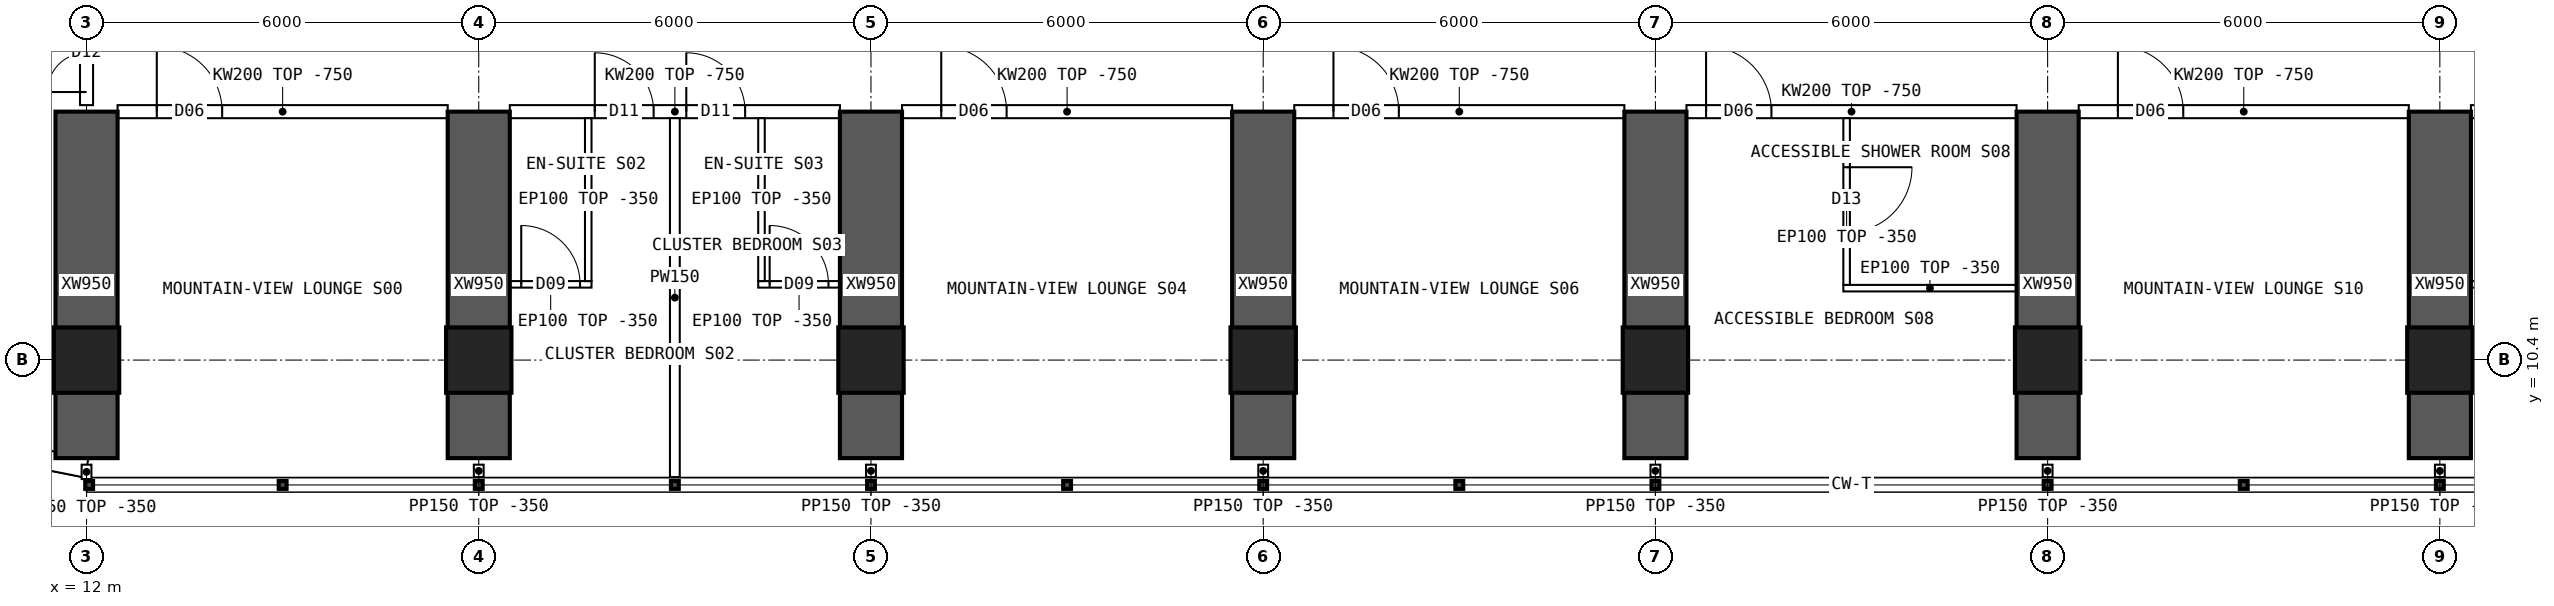
"""IFC4 building model, lengths in metres.
Left out: names, types, materials, properties, quantities, classifications, styles, units other than length and angle.
Written with IfcOpenShell. Run it as: python <this file> out.ifc"""

import sys

from ifc_helpers import new_model, si_unit, direction, frame, frame_2d, origin, origin_2d, place, context, subcontext, project, spatial, polyline, rectangle, hollow_rectangle, outline, extrude, element, fill, save


model = new_model("IFC4")
c1 = context("Model", 3, precision=1e-05, world=origin(), true_north=direction((0.0, 1.0)))
c2 = subcontext(c1, "Body", "Model", "MODEL_VIEW")
j1 = project(units=[si_unit("LENGTHUNIT", "METRE"), si_unit("PLANEANGLEUNIT", "RADIAN")], contexts=[c1])
p1 = place(None, origin())
s1 = spatial("IfcSite", under=j1, at=p1, CompositionType="ELEMENT")
p2 = place(p1, origin())
s2 = spatial("IfcBuilding", under=s1, at=p2, CompositionType="ELEMENT")
p3 = place(p2, frame((0.0, 0.0, 129.4)))
s3 = spatial("IfcBuildingStorey", under=s2, at=p3, CompositionType="ELEMENT", Elevation=129.4)
for number, where, z_axis, x_axis in (
    (1, (12.0, 10.4, 0.0), (0.0, 0.0, 1.0), (1.0, 0.0, 0.0)),
    (2, (18.0, 10.4, 0.0), (0.0, 0.0, 1.0), (1.0, 0.0, 0.0)),
    (3, (24.0, 10.4, 0.0), (0.0, 0.0, 1.0), (1.0, 0.0, 0.0)),
    (4, (30.0, 10.4, 0.0), (0.0, 0.0, 1.0), (1.0, 0.0, 0.0)),
    (5, (36.0, 10.4, 0.0), (0.0, 0.0, 1.0), (1.0, 0.0, 0.0)),
    (6, (42.0, 10.4, 0.0), (0.0, 0.0, 1.0), (1.0, 0.0, 0.0)),
    (7, (48.0, 10.4, 0.0), (0.0, 0.0, 1.0), (1.0, 0.0, 0.0)),
):
    element("IfcColumn", number, at=place(p3, frame(where, z_axis=z_axis, x_axis=x_axis)), inside=s3, PredefinedType="COLUMN", context=c2, shape_type="SweptSolid", body=[
        extrude(hollow_rectangle(XDim=1.0, YDim=1.0, WallThickness=0.1, at=origin_2d()), origin(), (0.0, 0.0, 1.0), 3.75),
    ])
for number, where, z_axis, x_axis in (
    (8, (12.0, 8.9, 0.0), (0.0, 0.0, 1.0), (0.0, 1.0, 0.0)),
    (9, (18.0, 8.9, 0.0), (0.0, 0.0, 1.0), (0.0, 1.0, 0.0)),
    (10, (24.0, 8.9, 0.0), (0.0, 0.0, 1.0), (0.0, 1.0, 0.0)),
    (11, (30.0, 8.9, 0.0), (0.0, 0.0, 1.0), (0.0, 1.0, 0.0)),
    (12, (36.0, 8.9, 0.0), (0.0, 0.0, 1.0), (0.0, 1.0, 0.0)),
    (13, (42.0, 8.9, 0.0), (0.0, 0.0, 1.0), (0.0, 1.0, 0.0)),
    (14, (48.0, 8.9, 0.0), (0.0, 0.0, 1.0), (0.0, 1.0, 0.0)),
):
    element("IfcWall", number, at=place(p3, frame(where, z_axis=z_axis, x_axis=x_axis)), inside=s3, PredefinedType="SHEAR", context=c2, shape_type="SweptSolid", body=[
        extrude(rectangle(XDim=5.3, YDim=0.95, at=frame_2d((2.65, 0.0))), origin(), (0.0, 0.0, 1.0), 3.75),
    ])
p4 = place(p3, frame((8.843, 9.378, 0.0), z_axis=(0.0, 0.0, 1.0), x_axis=(0.980787251524, -0.195080412259, 0.0)))
e15 = element("IfcWall", 15, at=p4, inside=s3, PredefinedType="SOLIDWALL", context=c2, shape_type="SweptSolid", body=[
    extrude(outline(polyline([(-0.03, -0.15), (3.249, -0.15), (3.189, 0.15), (0.03, 0.15), (-0.03, -0.15)])), origin(), (0.0, 0.0, 1.0), 3.4),
])
p5 = place(p4, frame((0.909, 0.0, 0.9)))
e16 = element("IfcOpeningElement", 16, at=p5, cuts=e15, PredefinedType="OPENING", context=c2, shape_type="SweptSolid", body=[
    extrude(rectangle(XDim=1.4, YDim=1.8, at=frame_2d((0.7, 0.9))), frame((0.0, 0.16, 0.0), z_axis=(0.0, -1.0, 0.0), x_axis=(1.0, 0.0, 0.0)), (0.0, 0.0, 1.0), 0.32),
])
p6 = place(p3, frame((12.475, 14.2, 0.0), z_axis=(0.0, 0.0, 1.0), x_axis=(1.0, 0.0, 0.0)))
e17 = element("IfcWall", 17, at=p6, inside=s3, PredefinedType="SOLIDWALL", context=c2, shape_type="SweptSolid", body=[
    extrude(outline(polyline([(0.0, 0.0), (5.05, 0.0), (5.05, 3.0), (0.0, 3.0), (0.0, 0.0)])), frame((0.0, 0.1, 0.0), z_axis=(0.0, -1.0, 0.0), x_axis=(1.0, 0.0, 0.0)), (0.0, 0.0, 1.0), 0.2),
])
p7 = place(p6, frame((0.6, 0.0, 0.0)))
e18 = element("IfcOpeningElement", 18, at=p7, cuts=e17, PredefinedType="OPENING", context=c2, shape_type="SweptSolid", body=[
    extrude(rectangle(XDim=1.0, YDim=2.1, at=frame_2d((0.5, 1.05))), frame((0.0, 0.11, 0.0), z_axis=(0.0, -1.0, 0.0), x_axis=(1.0, 0.0, 0.0)), (0.0, 0.0, 1.0), 0.22),
])
p8 = place(p3, frame((18.475, 14.2, 0.0), z_axis=(0.0, 0.0, 1.0), x_axis=(1.0, 0.0, 0.0)))
e19 = element("IfcWall", 19, at=p8, inside=s3, PredefinedType="SOLIDWALL", context=c2, shape_type="SweptSolid", body=[
    extrude(outline(polyline([(0.0, 0.0), (5.05, 0.0), (5.05, 3.0), (0.0, 3.0), (0.0, 0.0)])), frame((0.0, 0.1, 0.0), z_axis=(0.0, -1.0, 0.0), x_axis=(1.0, 0.0, 0.0)), (0.0, 0.0, 1.0), 0.2),
])
p9 = place(p8, frame((1.3, 0.0, 0.0)))
e20 = element("IfcOpeningElement", 20, at=p9, cuts=e19, PredefinedType="OPENING", context=c2, shape_type="SweptSolid", body=[
    extrude(rectangle(XDim=0.9, YDim=2.1, at=frame_2d((0.45, 1.05))), frame((0.0, 0.11, 0.0), z_axis=(0.0, -1.0, 0.0), x_axis=(1.0, 0.0, 0.0)), (0.0, 0.0, 1.0), 0.22),
])
p10 = place(p8, frame((2.7, 0.0, 0.0)))
e21 = element("IfcOpeningElement", 21, at=p10, cuts=e19, PredefinedType="OPENING", context=c2, shape_type="SweptSolid", body=[
    extrude(rectangle(XDim=0.9, YDim=2.1, at=frame_2d((0.45, 1.05))), frame((0.0, 0.11, 0.0), z_axis=(0.0, -1.0, 0.0), x_axis=(1.0, 0.0, 0.0)), (0.0, 0.0, 1.0), 0.22),
])
p11 = place(p3, frame((24.475, 14.2, 0.0), z_axis=(0.0, 0.0, 1.0), x_axis=(1.0, 0.0, 0.0)))
e22 = element("IfcWall", 22, at=p11, inside=s3, PredefinedType="SOLIDWALL", context=c2, shape_type="SweptSolid", body=[
    extrude(outline(polyline([(0.0, 0.0), (5.05, 0.0), (5.05, 3.0), (0.0, 3.0), (0.0, 0.0)])), frame((0.0, 0.1, 0.0), z_axis=(0.0, -1.0, 0.0), x_axis=(1.0, 0.0, 0.0)), (0.0, 0.0, 1.0), 0.2),
])
p12 = place(p11, frame((0.6, 0.0, 0.0)))
e23 = element("IfcOpeningElement", 23, at=p12, cuts=e22, PredefinedType="OPENING", context=c2, shape_type="SweptSolid", body=[
    extrude(rectangle(XDim=1.0, YDim=2.1, at=frame_2d((0.5, 1.05))), frame((0.0, 0.11, 0.0), z_axis=(0.0, -1.0, 0.0), x_axis=(1.0, 0.0, 0.0)), (0.0, 0.0, 1.0), 0.22),
])
p13 = place(p3, frame((30.475, 14.2, 0.0), z_axis=(0.0, 0.0, 1.0), x_axis=(1.0, 0.0, 0.0)))
e24 = element("IfcWall", 24, at=p13, inside=s3, PredefinedType="SOLIDWALL", context=c2, shape_type="SweptSolid", body=[
    extrude(outline(polyline([(0.0, 0.0), (5.05, 0.0), (5.05, 3.0), (0.0, 3.0), (0.0, 0.0)])), frame((0.0, 0.1, 0.0), z_axis=(0.0, -1.0, 0.0), x_axis=(1.0, 0.0, 0.0)), (0.0, 0.0, 1.0), 0.2),
])
p14 = place(p13, frame((0.6, 0.0, 0.0)))
e25 = element("IfcOpeningElement", 25, at=p14, cuts=e24, PredefinedType="OPENING", context=c2, shape_type="SweptSolid", body=[
    extrude(rectangle(XDim=1.0, YDim=2.1, at=frame_2d((0.5, 1.05))), frame((0.0, 0.11, 0.0), z_axis=(0.0, -1.0, 0.0), x_axis=(1.0, 0.0, 0.0)), (0.0, 0.0, 1.0), 0.22),
])
p15 = place(p3, frame((36.475, 14.2, 0.0), z_axis=(0.0, 0.0, 1.0), x_axis=(1.0, 0.0, 0.0)))
e26 = element("IfcWall", 26, at=p15, inside=s3, PredefinedType="SOLIDWALL", context=c2, shape_type="SweptSolid", body=[
    extrude(outline(polyline([(0.0, 0.0), (5.05, 0.0), (5.05, 3.0), (0.0, 3.0), (0.0, 0.0)])), frame((0.0, 0.1, 0.0), z_axis=(0.0, -1.0, 0.0), x_axis=(1.0, 0.0, 0.0)), (0.0, 0.0, 1.0), 0.2),
])
p16 = place(p15, frame((0.3, 0.0, 0.0)))
e27 = element("IfcOpeningElement", 27, at=p16, cuts=e26, PredefinedType="OPENING", context=c2, shape_type="SweptSolid", body=[
    extrude(rectangle(XDim=1.0, YDim=2.1, at=frame_2d((0.5, 1.05))), frame((0.0, 0.11, 0.0), z_axis=(0.0, -1.0, 0.0), x_axis=(1.0, 0.0, 0.0)), (0.0, 0.0, 1.0), 0.22),
])
p17 = place(p3, frame((42.475, 14.2, 0.0), z_axis=(0.0, 0.0, 1.0), x_axis=(1.0, 0.0, 0.0)))
e28 = element("IfcWall", 28, at=p17, inside=s3, PredefinedType="SOLIDWALL", context=c2, shape_type="SweptSolid", body=[
    extrude(outline(polyline([(0.0, 0.0), (5.05, 0.0), (5.05, 3.0), (0.0, 3.0), (0.0, 0.0)])), frame((0.0, 0.1, 0.0), z_axis=(0.0, -1.0, 0.0), x_axis=(1.0, 0.0, 0.0)), (0.0, 0.0, 1.0), 0.2),
])
p18 = place(p17, frame((0.6, 0.0, 0.0)))
e29 = element("IfcOpeningElement", 29, at=p18, cuts=e28, PredefinedType="OPENING", context=c2, shape_type="SweptSolid", body=[
    extrude(rectangle(XDim=1.0, YDim=2.1, at=frame_2d((0.5, 1.05))), frame((0.0, 0.11, 0.0), z_axis=(0.0, -1.0, 0.0), x_axis=(1.0, 0.0, 0.0)), (0.0, 0.0, 1.0), 0.22),
])
p19 = place(p3, frame((48.475, 14.2, 0.0), z_axis=(0.0, 0.0, 1.0), x_axis=(1.0, 0.0, 0.0)))
e30 = element("IfcWall", 30, at=p19, inside=s3, PredefinedType="SOLIDWALL", context=c2, shape_type="SweptSolid", body=[
    extrude(outline(polyline([(0.0, 0.0), (5.05, 0.0), (5.05, 3.0), (0.0, 3.0), (0.0, 0.0)])), frame((0.0, 0.1, 0.0), z_axis=(0.0, -1.0, 0.0), x_axis=(1.0, 0.0, 0.0)), (0.0, 0.0, 1.0), 0.2),
])
p20 = place(p19, frame((1.3, 0.0, 0.0)))
e31 = element("IfcOpeningElement", 31, at=p20, cuts=e30, PredefinedType="OPENING", context=c2, shape_type="SweptSolid", body=[
    extrude(rectangle(XDim=0.9, YDim=2.1, at=frame_2d((0.45, 1.05))), frame((0.0, 0.11, 0.0), z_axis=(0.0, -1.0, 0.0), x_axis=(1.0, 0.0, 0.0)), (0.0, 0.0, 1.0), 0.22),
])
p21 = place(p19, frame((2.7, 0.0, 0.0)))
e32 = element("IfcOpeningElement", 32, at=p21, cuts=e30, PredefinedType="OPENING", context=c2, shape_type="SweptSolid", body=[
    extrude(rectangle(XDim=0.9, YDim=2.1, at=frame_2d((0.45, 1.05))), frame((0.0, 0.11, 0.0), z_axis=(0.0, -1.0, 0.0), x_axis=(1.0, 0.0, 0.0)), (0.0, 0.0, 1.0), 0.22),
])
p22 = place(p3, frame((21.0, 8.61, 0.0), z_axis=(0.0, 0.0, 1.0), x_axis=(0.0, 1.0, 0.0)))
e33 = element("IfcWall", 33, at=p22, inside=s3, PredefinedType="PARTITIONING", context=c2, shape_type="SweptSolid", body=[
    extrude(outline(polyline([(0.0, 0.0), (5.49, 0.0), (5.49, 3.0), (5.442, 3.0), (5.44, 3.4), (1.992, 3.4), (1.99, 3.0), (1.592, 3.0), (1.59, 3.4), (0.0, 3.4), (0.0, 0.0)])), frame((0.0, 0.075, 0.0), z_axis=(0.0, -1.0, 0.0), x_axis=(1.0, 0.0, 0.0)), (0.0, 0.0, 1.0), 0.15),
])
p23 = place(p3, frame((19.725, 11.558, 0.0), z_axis=(0.0, 0.0, 1.0), x_axis=(-1.0, 0.0, 0.0)))
e34 = element("IfcWall", 34, at=p23, inside=s3, PredefinedType="PARTITIONING", context=c2, shape_type="SweptSolid", body=[
    extrude(rectangle(XDim=1.25, YDim=0.1, at=frame_2d((0.625, 0.0))), origin(), (0.0, 0.0, 1.0), 3.4),
])
p24 = place(p23, frame((0.175, 0.0, 0.0)))
e35 = element("IfcOpeningElement", 35, at=p24, cuts=e34, PredefinedType="OPENING", context=c2, shape_type="SweptSolid", body=[
    extrude(rectangle(XDim=0.9, YDim=2.1, at=frame_2d((0.45, 1.05))), frame((0.0, 0.06, 0.0), z_axis=(0.0, -1.0, 0.0), x_axis=(1.0, 0.0, 0.0)), (0.0, 0.0, 1.0), 0.12),
])
p25 = place(p3, frame((19.675, 11.608, 0.0), z_axis=(0.0, 0.0, 1.0), x_axis=(0.0, 1.0, 0.0)))
e36 = element("IfcWall", 36, at=p25, inside=s3, PredefinedType="PARTITIONING", context=c2, shape_type="SweptSolid", body=[
    extrude(outline(polyline([(0.0, 0.0), (2.492, 0.0), (2.492, 3.0), (2.444, 3.0), (2.442, 3.4), (0.0, 3.4), (0.0, 0.0)])), frame((0.0, 0.05, 0.0), z_axis=(0.0, -1.0, 0.0), x_axis=(1.0, 0.0, 0.0)), (0.0, 0.0, 1.0), 0.1),
])
p26 = place(p3, frame((23.525, 11.558, 0.0), z_axis=(0.0, 0.0, 1.0), x_axis=(-1.0, 0.0, 0.0)))
e37 = element("IfcWall", 37, at=p26, inside=s3, PredefinedType="PARTITIONING", context=c2, shape_type="SweptSolid", body=[
    extrude(rectangle(XDim=1.25, YDim=0.1, at=frame_2d((0.625, 0.0))), origin(), (0.0, 0.0, 1.0), 3.4),
])
p27 = place(p26, frame((0.175, 0.0, 0.0)))
e38 = element("IfcOpeningElement", 38, at=p27, cuts=e37, PredefinedType="OPENING", context=c2, shape_type="SweptSolid", body=[
    extrude(rectangle(XDim=0.9, YDim=2.1, at=frame_2d((0.45, 1.05))), frame((0.0, 0.06, 0.0), z_axis=(0.0, -1.0, 0.0), x_axis=(1.0, 0.0, 0.0)), (0.0, 0.0, 1.0), 0.12),
])
p28 = place(p3, frame((22.325, 11.608, 0.0), z_axis=(0.0, 0.0, 1.0), x_axis=(0.0, 1.0, 0.0)))
e39 = element("IfcWall", 39, at=p28, inside=s3, PredefinedType="PARTITIONING", context=c2, shape_type="SweptSolid", body=[
    extrude(outline(polyline([(0.0, 0.0), (2.492, 0.0), (2.492, 3.0), (2.444, 3.0), (2.442, 3.4), (0.0, 3.4), (0.0, 0.0)])), frame((0.0, 0.05, 0.0), z_axis=(0.0, -1.0, 0.0), x_axis=(1.0, 0.0, 0.0)), (0.0, 0.0, 1.0), 0.1),
])
p29 = place(p3, frame((38.875, 11.5, 0.0), z_axis=(0.0, 0.0, 1.0), x_axis=(1.0, 0.0, 0.0)))
e40 = element("IfcWall", 40, at=p29, inside=s3, PredefinedType="PARTITIONING", context=c2, shape_type="SweptSolid", body=[
    extrude(rectangle(XDim=2.65, YDim=0.1, at=frame_2d((1.325, 0.0))), origin(), (0.0, 0.0, 1.0), 3.4),
])
p30 = place(p3, frame((38.925, 11.55, 0.0), z_axis=(0.0, 0.0, 1.0), x_axis=(0.0, 1.0, 0.0)))
e41 = element("IfcWall", 41, at=p30, inside=s3, PredefinedType="PARTITIONING", context=c2, shape_type="SweptSolid", body=[
    extrude(outline(polyline([(0.0, 0.0), (2.55, 0.0), (2.55, 3.0), (2.502, 3.0), (2.5, 3.4), (0.0, 3.4), (0.0, 0.0)])), frame((0.0, 0.05, 0.0), z_axis=(0.0, -1.0, 0.0), x_axis=(1.0, 0.0, 0.0)), (0.0, 0.0, 1.0), 0.1),
])
p31 = place(p30, frame((0.8, 0.0, 0.0)))
e42 = element("IfcOpeningElement", 42, at=p31, cuts=e41, PredefinedType="OPENING", context=c2, shape_type="SweptSolid", body=[
    extrude(rectangle(XDim=1.0, YDim=2.1, at=frame_2d((0.5, 1.05))), frame((0.0, 0.06, 0.0), z_axis=(0.0, -1.0, 0.0), x_axis=(1.0, 0.0, 0.0)), (0.0, 0.0, 1.0), 0.12),
])
p32 = place(p3, frame((49.725, 11.558, 0.0), z_axis=(0.0, 0.0, 1.0), x_axis=(-1.0, 0.0, 0.0)))
e43 = element("IfcWall", 43, at=p32, inside=s3, PredefinedType="PARTITIONING", context=c2, shape_type="SweptSolid", body=[
    extrude(rectangle(XDim=1.25, YDim=0.1, at=frame_2d((0.625, 0.0))), origin(), (0.0, 0.0, 1.0), 3.4),
])
p33 = place(p32, frame((0.175, 0.0, 0.0)))
e44 = element("IfcOpeningElement", 44, at=p33, cuts=e43, PredefinedType="OPENING", context=c2, shape_type="SweptSolid", body=[
    extrude(rectangle(XDim=0.9, YDim=2.1, at=frame_2d((0.45, 1.05))), frame((0.0, 0.06, 0.0), z_axis=(0.0, -1.0, 0.0), x_axis=(1.0, 0.0, 0.0)), (0.0, 0.0, 1.0), 0.12),
])
p34 = place(p3, frame((12.0, 14.3, 0.0), z_axis=(0.0, 0.0, 1.0), x_axis=(0.0, 1.0, 0.0)))
e45 = element("IfcWall", 45, at=p34, inside=s3, PredefinedType="SOLIDWALL", context=c2, shape_type="SweptSolid", body=[
    extrude(outline(polyline([(0.0, 0.0), (1.6, 0.0), (1.6, 3.0), (0.0, 3.0), (0.0, 0.0)])), frame((0.0, 0.1, 0.0), z_axis=(0.0, -1.0, 0.0), x_axis=(1.0, 0.0, 0.0)), (0.0, 0.0, 1.0), 0.2),
])
p35 = place(p34, frame((0.2, 0.0, 0.0)))
e46 = element("IfcOpeningElement", 46, at=p35, cuts=e45, PredefinedType="OPENING", context=c2, shape_type="SweptSolid", body=[
    extrude(rectangle(XDim=1.2, YDim=2.1, at=frame_2d((0.6, 1.05))), frame((0.0, 0.11, 0.0), z_axis=(0.0, -1.0, 0.0), x_axis=(1.0, 0.0, 0.0)), (0.0, 0.0, 1.0), 0.22),
])
p36 = place(p3, frame((12.0, 8.8, 0.0), z_axis=(0.0, 0.0, 1.0), x_axis=(0.0, -1.0, 0.0)))
e47 = element("IfcWall", 47, at=p36, inside=s3, PredefinedType="PARTITIONING", context=c2, shape_type="SweptSolid", body=[
    extrude(rectangle(XDim=0.22, YDim=0.15, at=frame_2d((0.11, 0.0))), origin(), (0.0, 0.0, 1.0), 3.4),
])
for number, where, z_axis, x_axis in (
    (48, (18.0, 8.8, 0.0), (0.0, 0.0, 1.0), (0.0, -1.0, 0.0)),
    (49, (24.0, 8.8, 0.0), (0.0, 0.0, 1.0), (0.0, -1.0, 0.0)),
    (50, (30.0, 8.8, 0.0), (0.0, 0.0, 1.0), (0.0, -1.0, 0.0)),
    (51, (36.0, 8.8, 0.0), (0.0, 0.0, 1.0), (0.0, -1.0, 0.0)),
    (52, (42.0, 8.8, 0.0), (0.0, 0.0, 1.0), (0.0, -1.0, 0.0)),
    (53, (48.0, 8.8, 0.0), (0.0, 0.0, 1.0), (0.0, -1.0, 0.0)),
):
    element("IfcWall", number, at=place(p3, frame(where, z_axis=z_axis, x_axis=x_axis)), inside=s3, PredefinedType="PARTITIONING", context=c2, shape_type="SweptSolid", body=[
        extrude(rectangle(XDim=0.19, YDim=0.15, at=frame_2d((0.095, 0.0))), origin(), (0.0, 0.0, 1.0), 3.4),
    ])
p37 = place(p7, origin())
e54 = element("IfcDoor", 54, at=p37, inside=s3, OperationType="SINGLE_SWING_LEFT", PredefinedType="DOOR", context=c2, shape_type="SweptSolid", body=[
    extrude(rectangle(XDim=1.0, YDim=2.1, at=frame_2d((0.5, 1.05))), frame((0.0, 0.025, 0.0), z_axis=(0.0, -1.0, 0.0), x_axis=(1.0, 0.0, 0.0)), (0.0, 0.0, 1.0), 0.05),
])
fill(e18, e54)
p38 = place(p24, origin())
e55 = element("IfcDoor", 55, at=p38, inside=s3, OperationType="SINGLE_SWING_RIGHT", PredefinedType="DOOR", context=c2, shape_type="SweptSolid", body=[
    extrude(rectangle(XDim=0.9, YDim=2.1, at=frame_2d((0.45, 1.05))), frame((0.0, 0.025, 0.0), z_axis=(0.0, -1.0, 0.0), x_axis=(1.0, 0.0, 0.0)), (0.0, 0.0, 1.0), 0.05),
])
fill(e35, e55)
p39 = place(p9, origin())
e56 = element("IfcDoor", 56, at=p39, inside=s3, OperationType="SINGLE_SWING_LEFT", PredefinedType="DOOR", context=c2, shape_type="SweptSolid", body=[
    extrude(rectangle(XDim=0.9, YDim=2.1, at=frame_2d((0.45, 1.05))), frame((0.0, 0.025, 0.0), z_axis=(0.0, -1.0, 0.0), x_axis=(1.0, 0.0, 0.0)), (0.0, 0.0, 1.0), 0.05),
])
fill(e20, e56)
p40 = place(p27, origin())
e57 = element("IfcDoor", 57, at=p40, inside=s3, OperationType="SINGLE_SWING_RIGHT", PredefinedType="DOOR", context=c2, shape_type="SweptSolid", body=[
    extrude(rectangle(XDim=0.9, YDim=2.1, at=frame_2d((0.45, 1.05))), frame((0.0, 0.025, 0.0), z_axis=(0.0, -1.0, 0.0), x_axis=(1.0, 0.0, 0.0)), (0.0, 0.0, 1.0), 0.05),
])
fill(e38, e57)
p41 = place(p10, origin())
e58 = element("IfcDoor", 58, at=p41, inside=s3, OperationType="SINGLE_SWING_LEFT", PredefinedType="DOOR", context=c2, shape_type="SweptSolid", body=[
    extrude(rectangle(XDim=0.9, YDim=2.1, at=frame_2d((0.45, 1.05))), frame((0.0, 0.025, 0.0), z_axis=(0.0, -1.0, 0.0), x_axis=(1.0, 0.0, 0.0)), (0.0, 0.0, 1.0), 0.05),
])
fill(e21, e58)
p42 = place(p12, origin())
e59 = element("IfcDoor", 59, at=p42, inside=s3, OperationType="SINGLE_SWING_LEFT", PredefinedType="DOOR", context=c2, shape_type="SweptSolid", body=[
    extrude(rectangle(XDim=1.0, YDim=2.1, at=frame_2d((0.5, 1.05))), frame((0.0, 0.025, 0.0), z_axis=(0.0, -1.0, 0.0), x_axis=(1.0, 0.0, 0.0)), (0.0, 0.0, 1.0), 0.05),
])
fill(e23, e59)
p43 = place(p14, origin())
e60 = element("IfcDoor", 60, at=p43, inside=s3, OperationType="SINGLE_SWING_LEFT", PredefinedType="DOOR", context=c2, shape_type="SweptSolid", body=[
    extrude(rectangle(XDim=1.0, YDim=2.1, at=frame_2d((0.5, 1.05))), frame((0.0, 0.025, 0.0), z_axis=(0.0, -1.0, 0.0), x_axis=(1.0, 0.0, 0.0)), (0.0, 0.0, 1.0), 0.05),
])
fill(e25, e60)
p44 = place(p31, origin())
e61 = element("IfcDoor", 61, at=p44, inside=s3, OperationType="SINGLE_SWING_RIGHT", PredefinedType="DOOR", context=c2, shape_type="SweptSolid", body=[
    extrude(rectangle(XDim=1.0, YDim=2.1, at=frame_2d((0.5, 1.05))), frame((0.0, 0.025, 0.0), z_axis=(0.0, -1.0, 0.0), x_axis=(1.0, 0.0, 0.0)), (0.0, 0.0, 1.0), 0.05),
])
fill(e42, e61)
p45 = place(p16, origin())
e62 = element("IfcDoor", 62, at=p45, inside=s3, OperationType="SINGLE_SWING_LEFT", PredefinedType="DOOR", context=c2, shape_type="SweptSolid", body=[
    extrude(rectangle(XDim=1.0, YDim=2.1, at=frame_2d((0.5, 1.05))), frame((0.0, 0.025, 0.0), z_axis=(0.0, -1.0, 0.0), x_axis=(1.0, 0.0, 0.0)), (0.0, 0.0, 1.0), 0.05),
])
fill(e27, e62)
p46 = place(p18, origin())
e63 = element("IfcDoor", 63, at=p46, inside=s3, OperationType="SINGLE_SWING_LEFT", PredefinedType="DOOR", context=c2, shape_type="SweptSolid", body=[
    extrude(rectangle(XDim=1.0, YDim=2.1, at=frame_2d((0.5, 1.05))), frame((0.0, 0.025, 0.0), z_axis=(0.0, -1.0, 0.0), x_axis=(1.0, 0.0, 0.0)), (0.0, 0.0, 1.0), 0.05),
])
fill(e29, e63)
p47 = place(p35, origin())
e64 = element("IfcDoor", 64, at=p47, inside=s3, OperationType="DOUBLE_DOOR_SINGLE_SWING", PredefinedType="DOOR", context=c2, shape_type="SweptSolid", body=[
    extrude(rectangle(XDim=1.2, YDim=2.1, at=frame_2d((0.6, 1.05))), frame((0.0, 0.025, 0.0), z_axis=(0.0, -1.0, 0.0), x_axis=(1.0, 0.0, 0.0)), (0.0, 0.0, 1.0), 0.05),
])
fill(e46, e64)
save(model, sys.argv[1])
